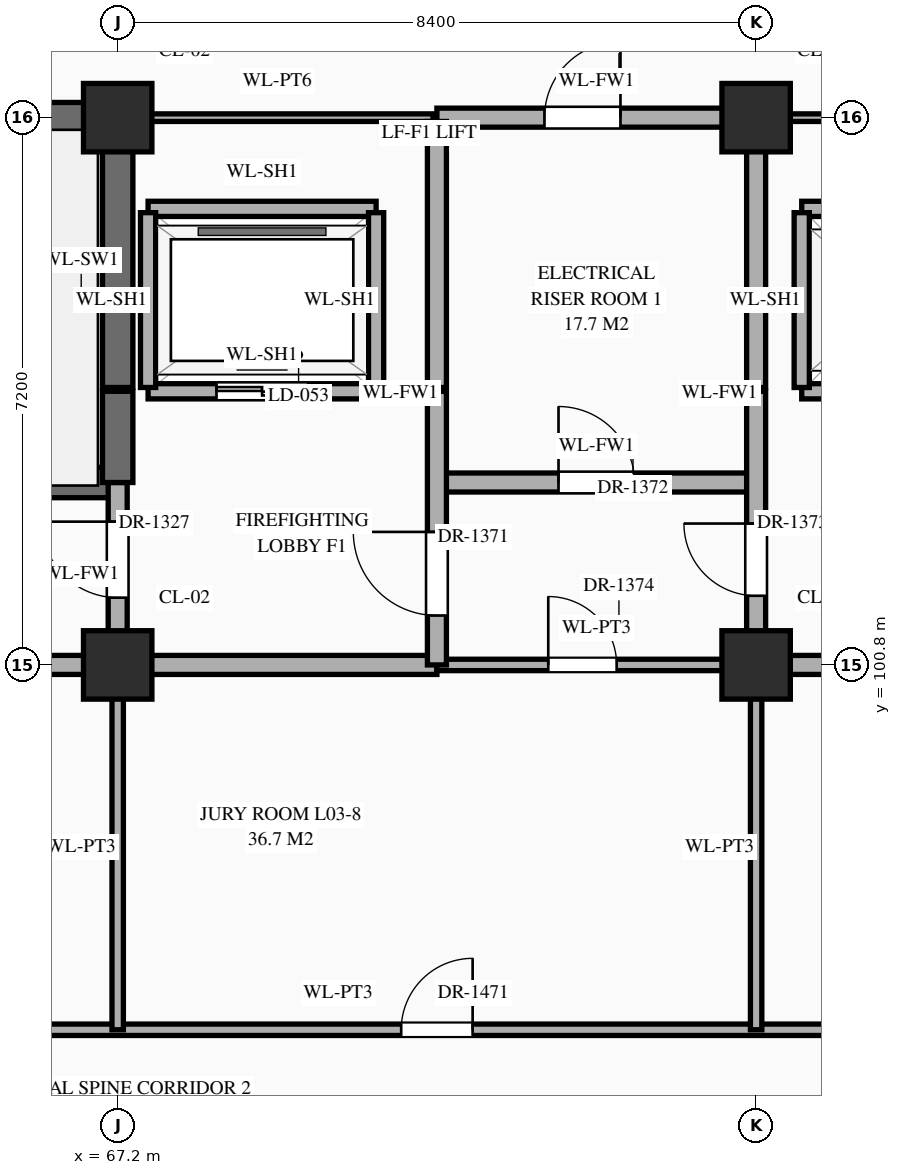
"""IFC4 building model, lengths in metres.
Left out: names, types, materials, properties, quantities, classifications, styles, units other than length and angle.
Written with IfcOpenShell. Run it as: python <this file> out.ifc"""

import sys

from ifc_helpers import new_model, si_unit, direction, frame, frame_2d, origin, origin_2d, place, context, subcontext, project, spatial, rectangle, extrude, element, fill, save


model = new_model("IFC4")
c1 = context("Model", 3, precision=1e-05, world=origin(), true_north=direction((0.0, 1.0)))
c2 = subcontext(c1, "Body", "Model", "MODEL_VIEW")
j1 = project(units=[si_unit("LENGTHUNIT", "METRE"), si_unit("PLANEANGLEUNIT", "RADIAN")], contexts=[c1])
p1 = place(None, origin())
s1 = spatial("IfcSite", under=j1, at=p1, CompositionType="ELEMENT")
p2 = place(p1, origin())
s2 = spatial("IfcBuilding", under=s1, at=p2, CompositionType="ELEMENT")
p3 = place(p2, frame((0.0, 0.0, 10.8)))
s3 = spatial("IfcBuildingStorey", under=s2, at=p3, CompositionType="ELEMENT", Elevation=10.8)
for number, where, z_axis, x_axis in (
    (1, (67.2, 100.8, 0.0), (0.0, 0.0, 1.0), (1.0, 0.0, 0.0)),
    (2, (67.2, 108.0, 0.0), (0.0, 0.0, 1.0), (1.0, 0.0, 0.0)),
    (3, (75.6, 100.8, 0.0), (0.0, 0.0, 1.0), (1.0, 0.0, 0.0)),
    (4, (75.6, 108.0, 0.0), (0.0, 0.0, 1.0), (1.0, 0.0, 0.0)),
):
    element("IfcColumn", number, at=place(p3, frame(where, z_axis=z_axis, x_axis=x_axis)), inside=s3, PredefinedType="COLUMN", context=c2, shape_type="SweptSolid", body=[
        extrude(rectangle(XDim=0.9, YDim=0.9, at=origin_2d()), origin(), (0.0, 0.0, 1.0), 5.4),
    ])
p4 = place(p3, frame((56.2, 96.0, 0.0), z_axis=(0.0, 0.0, 1.0), x_axis=(1.0, 0.0, 0.0)))
e5 = element("IfcWall", 5, at=p4, inside=s3, PredefinedType="STANDARD", context=c2, shape_type="SweptSolid", body=[
    extrude(rectangle(XDim=27.8, YDim=0.15, at=frame_2d((13.9, 0.0))), origin(), (0.0, 0.0, 1.0), 5.12),
])
p5 = place(p4, frame((0.68, 0.0, 0.0)))
e6 = element("IfcOpeningElement", 6, at=p5, cuts=e5, PredefinedType="OPENING", context=c2, shape_type="SweptSolid", body=[
    extrude(rectangle(XDim=1.24, YDim=2.3, at=frame_2d((0.62, 1.15))), frame((0.0, 0.087, 0.0), z_axis=(0.0, -1.0, 0.0), x_axis=(1.0, 0.0, 0.0)), (0.0, 0.0, 1.0), 0.174),
])
p6 = place(p4, frame((6.16, 0.0, 0.0)))
e7 = element("IfcOpeningElement", 7, at=p6, cuts=e5, PredefinedType="OPENING", context=c2, shape_type="SweptSolid", body=[
    extrude(rectangle(XDim=1.28, YDim=2.35, at=frame_2d((0.64, 1.175))), frame((0.0, 0.087, 0.0), z_axis=(0.0, -1.0, 0.0), x_axis=(1.0, 0.0, 0.0)), (0.0, 0.0, 1.0), 0.174),
])
p7 = place(p4, frame((14.73, 0.0, 0.0)))
e8 = element("IfcOpeningElement", 8, at=p7, cuts=e5, PredefinedType="OPENING", context=c2, shape_type="SweptSolid", body=[
    extrude(rectangle(XDim=0.94, YDim=2.3, at=frame_2d((0.47, 1.15))), frame((0.0, 0.087, 0.0), z_axis=(0.0, -1.0, 0.0), x_axis=(1.0, 0.0, 0.0)), (0.0, 0.0, 1.0), 0.174),
])
p8 = place(p4, frame((23.11, 0.0, 0.0)))
e9 = element("IfcOpeningElement", 9, at=p8, cuts=e5, PredefinedType="OPENING", context=c2, shape_type="SweptSolid", body=[
    extrude(rectangle(XDim=0.98, YDim=2.35, at=frame_2d((0.49, 1.175))), frame((0.0, 0.087, 0.0), z_axis=(0.0, -1.0, 0.0), x_axis=(1.0, 0.0, 0.0)), (0.0, 0.0, 1.0), 0.174),
])
p9 = place(p3, frame((58.8, 100.8, 0.0), z_axis=(0.0, 0.0, 1.0), x_axis=(1.0, 0.0, 0.0)))
e10 = element("IfcWall", 10, at=p9, inside=s3, PredefinedType="STANDARD", context=c2, shape_type="SweptSolid", body=[
    extrude(rectangle(XDim=12.6, YDim=0.25, at=frame_2d((6.3, 0.0))), origin(), (0.0, 0.0, 1.0), 4.27),
])
p10 = place(p9, frame((3.65, 0.0, 0.0)))
e11 = element("IfcOpeningElement", 11, at=p10, cuts=e10, PredefinedType="OPENING", context=c2, shape_type="SweptSolid", body=[
    extrude(rectangle(XDim=1.1, YDim=2.2, at=frame_2d((0.55, 1.1))), frame((0.0, 0.137, 0.0), z_axis=(0.0, -1.0, 0.0), x_axis=(1.0, 0.0, 0.0)), (0.0, 0.0, 1.0), 0.274),
])
p11 = place(p3, frame((71.4, 100.8, 0.0), z_axis=(0.0, 0.0, 1.0), x_axis=(1.0, 0.0, 0.0)))
e12 = element("IfcWall", 12, at=p11, inside=s3, PredefinedType="STANDARD", context=c2, shape_type="SweptSolid", body=[
    extrude(rectangle(XDim=4.2, YDim=0.15, at=frame_2d((2.1, 0.0))), origin(), (0.0, 0.0, 1.0), 4.27),
])
p12 = place(p11, frame((1.465, 0.0, 0.0)))
e13 = element("IfcOpeningElement", 13, at=p12, cuts=e12, PredefinedType="OPENING", context=c2, shape_type="SweptSolid", body=[
    extrude(rectangle(XDim=0.9, YDim=2.15, at=frame_2d((0.45, 1.075))), frame((0.0, 0.087, 0.0), z_axis=(0.0, -1.0, 0.0), x_axis=(1.0, 0.0, 0.0)), (0.0, 0.0, 1.0), 0.174),
])
p13 = place(p3, frame((75.6, 100.8, 0.0), z_axis=(0.0, 0.0, 1.0), x_axis=(1.0, 0.0, 0.0)))
e14 = element("IfcWall", 14, at=p13, inside=s3, PredefinedType="STANDARD", context=c2, shape_type="SweptSolid", body=[
    extrude(rectangle(XDim=16.8, YDim=0.25, at=frame_2d((8.4, 0.0))), origin(), (0.0, 0.0, 1.0), 4.27),
])
p14 = place(p13, frame((3.65, 0.0, 0.0)))
e15 = element("IfcOpeningElement", 15, at=p14, cuts=e14, PredefinedType="OPENING", context=c2, shape_type="SweptSolid", body=[
    extrude(rectangle(XDim=1.1, YDim=2.2, at=frame_2d((0.55, 1.1))), frame((0.0, 0.137, 0.0), z_axis=(0.0, -1.0, 0.0), x_axis=(1.0, 0.0, 0.0)), (0.0, 0.0, 1.0), 0.274),
])
p15 = place(p13, frame((9.81, 0.0, 0.0)))
e16 = element("IfcOpeningElement", 16, at=p15, cuts=e14, PredefinedType="OPENING", context=c2, shape_type="SweptSolid", body=[
    extrude(rectangle(XDim=0.95, YDim=2.15, at=frame_2d((0.475, 1.075))), frame((0.0, 0.137, 0.0), z_axis=(0.0, -1.0, 0.0), x_axis=(1.0, 0.0, 0.0)), (0.0, 0.0, 1.0), 0.274),
])
p16 = place(p13, frame((12.45, 0.0, 0.0)))
e17 = element("IfcOpeningElement", 17, at=p16, cuts=e14, PredefinedType="OPENING", context=c2, shape_type="SweptSolid", body=[
    extrude(rectangle(XDim=1.1, YDim=2.2, at=frame_2d((0.55, 1.1))), frame((0.0, 0.137, 0.0), z_axis=(0.0, -1.0, 0.0), x_axis=(1.0, 0.0, 0.0)), (0.0, 0.0, 1.0), 0.274),
])
p17 = place(p13, frame((14.815, 0.0, 0.0)))
e18 = element("IfcOpeningElement", 18, at=p17, cuts=e14, PredefinedType="OPENING", context=c2, shape_type="SweptSolid", body=[
    extrude(rectangle(XDim=1.0, YDim=2.2, at=frame_2d((0.5, 1.1))), frame((0.0, 0.137, 0.0), z_axis=(0.0, -1.0, 0.0), x_axis=(1.0, 0.0, 0.0)), (0.0, 0.0, 1.0), 0.274),
])
p18 = place(p3, frame((58.8, 103.2, 0.0), z_axis=(0.0, 0.0, 1.0), x_axis=(1.0, 0.0, 0.0)))
e19 = element("IfcWall", 19, at=p18, inside=s3, PredefinedType="SHEAR", context=c2, shape_type="SweptSolid", body=[
    extrude(rectangle(XDim=8.4, YDim=0.4, at=frame_2d((4.2, 0.0))), origin(), (0.0, 0.0, 1.0), 5.12),
])
p19 = place(p18, frame((0.65, 0.0, 0.0)))
e20 = element("IfcOpeningElement", 20, at=p19, cuts=e19, PredefinedType="OPENING", context=c2, shape_type="SweptSolid", body=[
    extrude(rectangle(XDim=1.1, YDim=2.2, at=frame_2d((0.55, 1.1))), frame((0.0, 0.212, 0.0), z_axis=(0.0, -1.0, 0.0), x_axis=(1.0, 0.0, 0.0)), (0.0, 0.0, 1.0), 0.424),
])
p20 = place(p3, frame((71.4, 103.2, 0.0), z_axis=(0.0, 0.0, 1.0), x_axis=(1.0, 0.0, 0.0)))
e21 = element("IfcWall", 21, at=p20, inside=s3, PredefinedType="STANDARD", context=c2, shape_type="SweptSolid", body=[
    extrude(rectangle(XDim=4.2, YDim=0.25, at=frame_2d((2.1, 0.0))), origin(), (0.0, 0.0, 1.0), 5.12),
])
p21 = place(p20, frame((1.6, 0.0, 0.0)))
e22 = element("IfcOpeningElement", 22, at=p21, cuts=e21, PredefinedType="OPENING", context=c2, shape_type="SweptSolid", body=[
    extrude(rectangle(XDim=1.0, YDim=2.2, at=frame_2d((0.5, 1.1))), frame((0.0, 0.137, 0.0), z_axis=(0.0, -1.0, 0.0), x_axis=(1.0, 0.0, 0.0)), (0.0, 0.0, 1.0), 0.274),
])
p22 = place(p3, frame((67.6, 104.4, 0.0), z_axis=(0.0, 0.0, 1.0), x_axis=(1.0, 0.0, 0.0)))
e23 = element("IfcWall", 23, at=p22, inside=s3, PredefinedType="STANDARD", context=c2, shape_type="SweptSolid", body=[
    extrude(rectangle(XDim=3.0, YDim=0.2, at=frame_2d((1.5, 0.0))), origin(), (0.0, 0.0, 1.0), 5.12),
])
p23 = place(p22, frame((0.9, 0.0, 0.0)))
e24 = element("IfcOpeningElement", 24, at=p23, cuts=e23, PredefinedType="OPENING", context=c2, shape_type="SweptSolid", body=[
    extrude(rectangle(XDim=1.2, YDim=2.15, at=frame_2d((0.6, 1.075))), frame((0.0, 0.112, 0.0), z_axis=(0.0, -1.0, 0.0), x_axis=(1.0, 0.0, 0.0)), (0.0, 0.0, 1.0), 0.224),
])
p24 = place(p3, frame((76.2, 104.4, 0.0), z_axis=(0.0, 0.0, 1.0), x_axis=(1.0, 0.0, 0.0)))
e25 = element("IfcWall", 25, at=p24, inside=s3, PredefinedType="STANDARD", context=c2, shape_type="SweptSolid", body=[
    extrude(rectangle(XDim=2.4, YDim=0.2, at=frame_2d((1.2, 0.0))), origin(), (0.0, 0.0, 1.0), 5.12),
])
p25 = place(p24, frame((0.7, 0.0, 0.0)))
e26 = element("IfcOpeningElement", 26, at=p25, cuts=e25, PredefinedType="OPENING", context=c2, shape_type="SweptSolid", body=[
    extrude(rectangle(XDim=1.0, YDim=2.15, at=frame_2d((0.5, 1.075))), frame((0.0, 0.112, 0.0), z_axis=(0.0, -1.0, 0.0), x_axis=(1.0, 0.0, 0.0)), (0.0, 0.0, 1.0), 0.224),
])
p26 = place(p3, frame((67.6, 106.8, 0.0), z_axis=(0.0, 0.0, 1.0), x_axis=(1.0, 0.0, 0.0)))
e27 = element("IfcWall", 27, at=p26, inside=s3, PredefinedType="STANDARD", context=c2, shape_type="SweptSolid", body=[
    extrude(rectangle(XDim=3.0, YDim=0.2, at=frame_2d((1.5, 0.0))), origin(), (0.0, 0.0, 1.0), 5.12),
])
p27 = place(p3, frame((76.2, 106.8, 0.0), z_axis=(0.0, 0.0, 1.0), x_axis=(1.0, 0.0, 0.0)))
e28 = element("IfcWall", 28, at=p27, inside=s3, PredefinedType="STANDARD", context=c2, shape_type="SweptSolid", body=[
    extrude(rectangle(XDim=2.4, YDim=0.2, at=frame_2d((1.2, 0.0))), origin(), (0.0, 0.0, 1.0), 5.12),
])
p28 = place(p3, frame((58.8, 108.0, 0.0), z_axis=(0.0, 0.0, 1.0), x_axis=(1.0, 0.0, 0.0)))
e29 = element("IfcWall", 29, at=p28, inside=s3, PredefinedType="SHEAR", context=c2, shape_type="SweptSolid", body=[
    extrude(rectangle(XDim=8.4, YDim=0.4, at=frame_2d((4.2, 0.0))), origin(), (0.0, 0.0, 1.0), 5.12),
])
p29 = place(p3, frame((67.25, 108.0, 0.0), z_axis=(0.0, 0.0, 1.0), x_axis=(1.0, 0.0, 0.0)))
e30 = element("IfcWall", 30, at=p29, inside=s3, PredefinedType="STANDARD", context=c2, shape_type="SweptSolid", body=[
    extrude(rectangle(XDim=4.1, YDim=0.1, at=frame_2d((2.05, 0.0))), origin(), (0.0, 0.0, 1.0), 4.27),
])
p30 = place(p3, frame((71.4, 108.0, 0.0), z_axis=(0.0, 0.0, 1.0), x_axis=(1.0, 0.0, 0.0)))
e31 = element("IfcWall", 31, at=p30, inside=s3, PredefinedType="STANDARD", context=c2, shape_type="SweptSolid", body=[
    extrude(rectangle(XDim=4.2, YDim=0.25, at=frame_2d((2.1, 0.0))), origin(), (0.0, 0.0, 1.0), 4.27),
])
p31 = place(p30, frame((1.415, 0.0, 0.0)))
e32 = element("IfcOpeningElement", 32, at=p31, cuts=e31, PredefinedType="OPENING", context=c2, shape_type="SweptSolid", body=[
    extrude(rectangle(XDim=1.0, YDim=2.2, at=frame_2d((0.5, 1.1))), frame((0.0, 0.137, 0.0), z_axis=(0.0, -1.0, 0.0), x_axis=(1.0, 0.0, 0.0)), (0.0, 0.0, 1.0), 0.274),
])
p32 = place(p3, frame((75.65, 108.0, 0.0), z_axis=(0.0, 0.0, 1.0), x_axis=(1.0, 0.0, 0.0)))
e33 = element("IfcWall", 33, at=p32, inside=s3, PredefinedType="STANDARD", context=c2, shape_type="SweptSolid", body=[
    extrude(rectangle(XDim=6.15, YDim=0.1, at=frame_2d((3.075, 0.0))), origin(), (0.0, 0.0, 1.0), 4.27),
])
p33 = place(p3, frame((67.2, 96.0, 0.0), z_axis=(0.0, 0.0, 1.0), x_axis=(0.0, 1.0, 0.0)))
e34 = element("IfcWall", 34, at=p33, inside=s3, PredefinedType="STANDARD", context=c2, shape_type="SweptSolid", body=[
    extrude(rectangle(XDim=4.8, YDim=0.15, at=frame_2d((2.4, 0.0))), origin(), (0.0, 0.0, 1.0), 4.37),
])
p34 = place(p3, frame((67.2, 100.8, 0.0), z_axis=(0.0, 0.0, 1.0), x_axis=(0.0, 1.0, 0.0)))
e35 = element("IfcWall", 35, at=p34, inside=s3, PredefinedType="STANDARD", context=c2, shape_type="SweptSolid", body=[
    extrude(rectangle(XDim=2.4, YDim=0.25, at=frame_2d((1.2, 0.0))), origin(), (0.0, 0.0, 1.0), 4.37),
])
p35 = place(p34, frame((0.885, 0.0, 0.0)))
e36 = element("IfcOpeningElement", 36, at=p35, cuts=e35, PredefinedType="OPENING", context=c2, shape_type="SweptSolid", body=[
    extrude(rectangle(XDim=1.0, YDim=2.2, at=frame_2d((0.5, 1.1))), frame((0.0, 0.137, 0.0), z_axis=(0.0, -1.0, 0.0), x_axis=(1.0, 0.0, 0.0)), (0.0, 0.0, 1.0), 0.274),
])
p36 = place(p3, frame((67.2, 103.2, 0.0), z_axis=(0.0, 0.0, 1.0), x_axis=(0.0, 1.0, 0.0)))
e37 = element("IfcWall", 37, at=p36, inside=s3, PredefinedType="SHEAR", context=c2, shape_type="SweptSolid", body=[
    extrude(rectangle(XDim=1.2, YDim=0.4, at=frame_2d((0.6, 0.0))), origin(), (0.0, 0.0, 1.0), 5.12),
])
p37 = place(p3, frame((67.2, 104.45, 0.0), z_axis=(0.0, 0.0, 1.0), x_axis=(0.0, 1.0, 0.0)))
e38 = element("IfcWall", 38, at=p37, inside=s3, PredefinedType="SHEAR", context=c2, shape_type="SweptSolid", body=[
    extrude(rectangle(XDim=3.5, YDim=0.4, at=frame_2d((1.75, 0.0))), origin(), (0.0, 0.0, 1.0), 5.12),
])
for number, where, z_axis, x_axis in (
    (39, (67.6, 104.45, 0.0), (0.0, 0.0, 1.0), (0.0, 1.0, 0.0)),
    (40, (70.6, 104.45, 0.0), (0.0, 0.0, 1.0), (0.0, 1.0, 0.0)),
):
    element("IfcWall", number, at=place(p3, frame(where, z_axis=z_axis, x_axis=x_axis)), inside=s3, PredefinedType="STANDARD", context=c2, shape_type="SweptSolid", body=[
        extrude(rectangle(XDim=2.3, YDim=0.2, at=frame_2d((1.15, 0.0))), origin(), (0.0, 0.0, 1.0), 5.12),
    ])
p38 = place(p3, frame((71.4, 100.8, 0.0), z_axis=(0.0, 0.0, 1.0), x_axis=(0.0, 1.0, 0.0)))
e41 = element("IfcWall", 41, at=p38, inside=s3, PredefinedType="STANDARD", context=c2, shape_type="SweptSolid", body=[
    extrude(rectangle(XDim=3.6, YDim=0.25, at=frame_2d((1.8, 0.0))), origin(), (0.0, 0.0, 1.0), 4.72),
])
p39 = place(p38, frame((0.65, 0.0, 0.0)))
e42 = element("IfcOpeningElement", 42, at=p39, cuts=e41, PredefinedType="OPENING", context=c2, shape_type="SweptSolid", body=[
    extrude(rectangle(XDim=1.1, YDim=2.2, at=frame_2d((0.55, 1.1))), frame((0.0, 0.137, 0.0), z_axis=(0.0, -1.0, 0.0), x_axis=(1.0, 0.0, 0.0)), (0.0, 0.0, 1.0), 0.274),
])
p40 = place(p3, frame((71.4, 104.45, 0.0), z_axis=(0.0, 0.0, 1.0), x_axis=(0.0, 1.0, 0.0)))
e43 = element("IfcWall", 43, at=p40, inside=s3, PredefinedType="STANDARD", context=c2, shape_type="SweptSolid", body=[
    extrude(rectangle(XDim=3.5, YDim=0.25, at=frame_2d((1.75, 0.0))), origin(), (0.0, 0.0, 1.0), 4.72),
])
p41 = place(p3, frame((75.6, 96.0, 0.0), z_axis=(0.0, 0.0, 1.0), x_axis=(0.0, 1.0, 0.0)))
e44 = element("IfcWall", 44, at=p41, inside=s3, PredefinedType="STANDARD", context=c2, shape_type="SweptSolid", body=[
    extrude(rectangle(XDim=4.8, YDim=0.15, at=frame_2d((2.4, 0.0))), origin(), (0.0, 0.0, 1.0), 4.37),
])
p42 = place(p3, frame((75.6, 100.8, 0.0), z_axis=(0.0, 0.0, 1.0), x_axis=(0.0, 1.0, 0.0)))
e45 = element("IfcWall", 45, at=p42, inside=s3, PredefinedType="STANDARD", context=c2, shape_type="SweptSolid", body=[
    extrude(rectangle(XDim=3.6, YDim=0.25, at=frame_2d((1.8, 0.0))), origin(), (0.0, 0.0, 1.0), 4.37),
])
p43 = place(p42, frame((0.91, 0.0, 0.0)))
e46 = element("IfcOpeningElement", 46, at=p43, cuts=e45, PredefinedType="OPENING", context=c2, shape_type="SweptSolid", body=[
    extrude(rectangle(XDim=0.95, YDim=2.15, at=frame_2d((0.475, 1.075))), frame((0.0, 0.137, 0.0), z_axis=(0.0, -1.0, 0.0), x_axis=(1.0, 0.0, 0.0)), (0.0, 0.0, 1.0), 0.274),
])
p44 = place(p3, frame((75.6, 104.45, 0.0), z_axis=(0.0, 0.0, 1.0), x_axis=(0.0, 1.0, 0.0)))
e47 = element("IfcWall", 47, at=p44, inside=s3, PredefinedType="STANDARD", context=c2, shape_type="SweptSolid", body=[
    extrude(rectangle(XDim=3.5, YDim=0.25, at=frame_2d((1.75, 0.0))), origin(), (0.0, 0.0, 1.0), 4.37),
])
p45 = place(p3, frame((76.2, 104.45, 0.0), z_axis=(0.0, 0.0, 1.0), x_axis=(0.0, 1.0, 0.0)))
e48 = element("IfcWall", 48, at=p45, inside=s3, PredefinedType="STANDARD", context=c2, shape_type="SweptSolid", body=[
    extrude(rectangle(XDim=2.3, YDim=0.2, at=frame_2d((1.15, 0.0))), origin(), (0.0, 0.0, 1.0), 5.12),
])
p46 = place(p23, origin())
e49 = element("IfcDoor", 49, at=p46, inside=s3, OperationType="DOUBLE_DOOR_SLIDING", PredefinedType="DOOR", context=c2, shape_type="SweptSolid", body=[
    extrude(rectangle(XDim=1.2, YDim=2.15, at=frame_2d((0.6, 1.075))), frame((0.0, 0.025, 0.0), z_axis=(0.0, -1.0, 0.0), x_axis=(1.0, 0.0, 0.0)), (0.0, 0.0, 1.0), 0.05),
])
fill(e24, e49)
p47 = place(p35, origin())
e50 = element("IfcDoor", 50, at=p47, inside=s3, OperationType="SINGLE_SWING_RIGHT", PredefinedType="DOOR", context=c2, shape_type="SweptSolid", body=[
    extrude(rectangle(XDim=1.0, YDim=2.2, at=frame_2d((0.5, 1.1))), frame((0.0, 0.025, 0.0), z_axis=(0.0, -1.0, 0.0), x_axis=(1.0, 0.0, 0.0)), (0.0, 0.0, 1.0), 0.05),
])
fill(e36, e50)
p48 = place(p39, origin())
e51 = element("IfcDoor", 51, at=p48, inside=s3, OperationType="SINGLE_SWING_RIGHT", PredefinedType="DOOR", context=c2, shape_type="SweptSolid", body=[
    extrude(rectangle(XDim=1.1, YDim=2.2, at=frame_2d((0.55, 1.1))), frame((0.0, 0.025, 0.0), z_axis=(0.0, -1.0, 0.0), x_axis=(1.0, 0.0, 0.0)), (0.0, 0.0, 1.0), 0.05),
])
fill(e42, e51)
p49 = place(p21, origin())
e52 = element("IfcDoor", 52, at=p49, inside=s3, OperationType="SINGLE_SWING_LEFT", PredefinedType="DOOR", context=c2, shape_type="SweptSolid", body=[
    extrude(rectangle(XDim=1.0, YDim=2.2, at=frame_2d((0.5, 1.1))), frame((0.0, 0.025, 0.0), z_axis=(0.0, -1.0, 0.0), x_axis=(1.0, 0.0, 0.0)), (0.0, 0.0, 1.0), 0.05),
])
fill(e22, e52)
p50 = place(p43, origin())
e53 = element("IfcDoor", 53, at=p50, inside=s3, OperationType="SINGLE_SWING_RIGHT", PredefinedType="DOOR", context=c2, shape_type="SweptSolid", body=[
    extrude(rectangle(XDim=0.95, YDim=2.15, at=frame_2d((0.475, 1.075))), frame((0.0, 0.025, 0.0), z_axis=(0.0, -1.0, 0.0), x_axis=(1.0, 0.0, 0.0)), (0.0, 0.0, 1.0), 0.05),
])
fill(e46, e53)
p51 = place(p12, origin())
e54 = element("IfcDoor", 54, at=p51, inside=s3, OperationType="SINGLE_SWING_LEFT", PredefinedType="DOOR", context=c2, shape_type="SweptSolid", body=[
    extrude(rectangle(XDim=0.9, YDim=2.15, at=frame_2d((0.45, 1.075))), frame((0.0, 0.025, 0.0), z_axis=(0.0, -1.0, 0.0), x_axis=(1.0, 0.0, 0.0)), (0.0, 0.0, 1.0), 0.05),
])
fill(e13, e54)
p52 = place(p31, origin())
e55 = element("IfcDoor", 55, at=p52, inside=s3, OperationType="SINGLE_SWING_RIGHT", PredefinedType="DOOR", context=c2, shape_type="SweptSolid", body=[
    extrude(rectangle(XDim=1.0, YDim=2.2, at=frame_2d((0.5, 1.1))), frame((0.0, 0.025, 0.0), z_axis=(0.0, -1.0, 0.0), x_axis=(1.0, 0.0, 0.0)), (0.0, 0.0, 1.0), 0.05),
])
fill(e32, e55)
p53 = place(p7, origin())
e56 = element("IfcDoor", 56, at=p53, inside=s3, OperationType="SINGLE_SWING_RIGHT", PredefinedType="DOOR", context=c2, shape_type="SweptSolid", body=[
    extrude(rectangle(XDim=0.94, YDim=2.3, at=frame_2d((0.47, 1.15))), frame((0.0, 0.025, 0.0), z_axis=(0.0, -1.0, 0.0), x_axis=(1.0, 0.0, 0.0)), (0.0, 0.0, 1.0), 0.05),
])
fill(e8, e56)
save(model, sys.argv[1])
